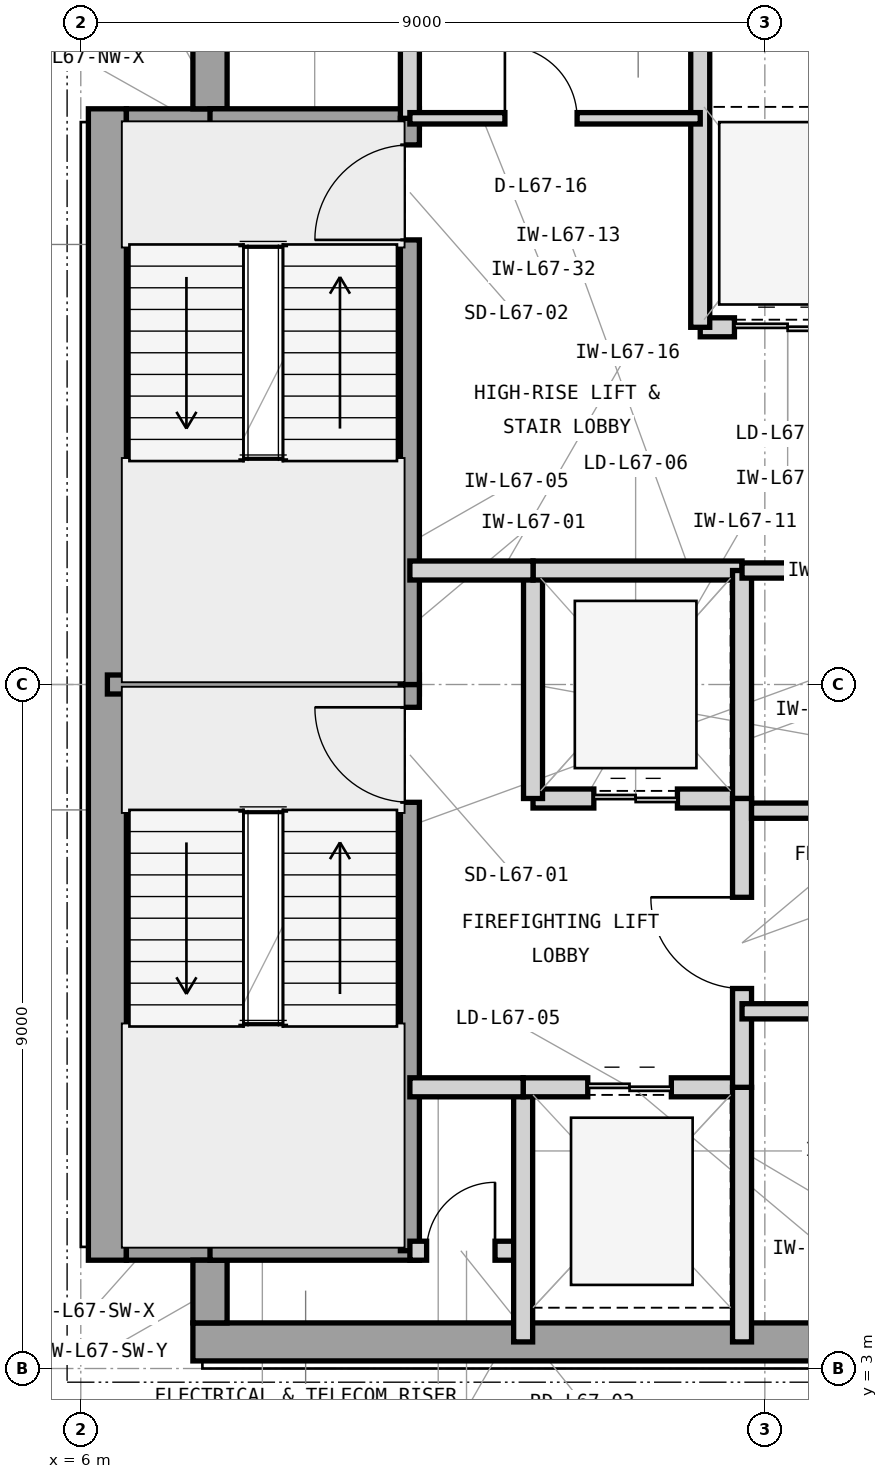
"""IFC4 building model, lengths in metres.
Left out: names, types, materials, properties, quantities, classifications, styles, units other than length and angle.
Written with IfcOpenShell. Run it as: python <this file> out.ifc"""

import sys

from ifc_helpers import new_model, si_unit, direction, frame, frame_2d, origin, place, context, subcontext, project, spatial, rectangle, extrude, element, fill, save


model = new_model("IFC4")
c1 = context("Model", 3, precision=1e-05, world=origin(), true_north=direction((0.0, 1.0)))
c2 = subcontext(c1, "Body", "Model", "MODEL_VIEW")
j1 = project(units=[si_unit("LENGTHUNIT", "METRE"), si_unit("PLANEANGLEUNIT", "RADIAN")], contexts=[c1])
p1 = place(None, origin())
s1 = spatial("IfcSite", under=j1, at=p1, CompositionType="ELEMENT")
p2 = place(p1, origin())
s2 = spatial("IfcBuilding", under=s1, at=p2, CompositionType="ELEMENT")
p3 = place(p2, frame((0.0, 0.0, 274.2)))
s3 = spatial("IfcBuildingStorey", under=s2, at=p3, CompositionType="ELEMENT", Elevation=274.2)
p4 = place(p3, frame((7.475, 3.35, 0.0), z_axis=(0.0, 0.0, 1.0), x_axis=(1.0, 0.0, 0.0)))
e1 = element("IfcWall", 1, at=p4, inside=s3, PredefinedType="SHEAR", context=c2, shape_type="SweptSolid", body=[
    extrude(rectangle(XDim=16.425, YDim=0.5, at=frame_2d((8.212, 0.0))), origin(), (0.0, 0.0, 1.0), 3.9),
])
p5 = place(p3, frame((6.35, 4.425, 0.0), z_axis=(0.0, 0.0, 1.0), x_axis=(0.0, 1.0, 0.0)))
e2 = element("IfcWall", 2, at=p5, inside=s3, PredefinedType="SHEAR", context=c2, shape_type="SweptSolid", body=[
    extrude(rectangle(XDim=15.15, YDim=0.5, at=frame_2d((7.575, 0.0))), origin(), (0.0, 0.0, 1.0), 3.9),
])
p6 = place(p3, frame((6.6, 4.65, 0.0), z_axis=(0.0, 0.0, 1.0), x_axis=(1.0, 0.0, 0.0)))
e3 = element("IfcWall", 3, at=p6, inside=s3, PredefinedType="SHEAR", context=c2, shape_type="SweptSolid", body=[
    extrude(rectangle(XDim=1.325, YDim=0.45, at=frame_2d((0.663, 0.0))), origin(), (0.0, 0.0, 1.0), 3.9),
])
p7 = place(p3, frame((7.7, 3.6, 0.0), z_axis=(0.0, 0.0, 1.0), x_axis=(0.0, 1.0, 0.0)))
e4 = element("IfcWall", 4, at=p7, inside=s3, PredefinedType="SHEAR", context=c2, shape_type="SweptSolid", body=[
    extrude(rectangle(XDim=0.825, YDim=0.45, at=frame_2d((0.413, 0.0))), origin(), (0.0, 0.0, 1.0), 3.9),
])
p8 = place(p3, frame((6.6, 19.35, 0.0), z_axis=(0.0, 0.0, 1.0), x_axis=(1.0, 0.0, 0.0)))
e5 = element("IfcWall", 5, at=p8, inside=s3, PredefinedType="SHEAR", context=c2, shape_type="SweptSolid", body=[
    extrude(rectangle(XDim=1.325, YDim=0.45, at=frame_2d((0.663, 0.0))), origin(), (0.0, 0.0, 1.0), 3.9),
])
p9 = place(p3, frame((7.7, 19.575, 0.0), z_axis=(0.0, 0.0, 1.0), x_axis=(0.0, 1.0, 0.0)))
e6 = element("IfcWall", 6, at=p9, inside=s3, PredefinedType="SHEAR", context=c2, shape_type="SweptSolid", body=[
    extrude(rectangle(XDim=0.825, YDim=0.45, at=frame_2d((0.413, 0.0))), origin(), (0.0, 0.0, 1.0), 3.9),
])
p10 = place(p3, frame((6.35, 12.0, 0.0), z_axis=(0.0, 0.0, 1.0), x_axis=(1.0, 0.0, 0.0)))
e7 = element("IfcWall", 7, at=p10, inside=s3, PredefinedType="SHEAR", context=c2, shape_type="SweptSolid", body=[
    extrude(rectangle(XDim=4.105, YDim=0.25, at=frame_2d((2.052, 0.0))), origin(), (0.0, 0.0, 1.0), 3.9),
])
for number, where, z_axis, x_axis in (
    (8, (7.7, 4.55, 0.0), (0.0, 0.0, 1.0), (1.0, 0.0, 0.0)),
    (9, (7.7, 19.45, 0.0), (0.0, 0.0, 1.0), (1.0, 0.0, 0.0)),
):
    element("IfcWall", number, at=place(p3, frame(where, z_axis=z_axis, x_axis=x_axis)), inside=s3, PredefinedType="SHEAR", context=c2, shape_type="SweptSolid", body=[
        extrude(rectangle(XDim=2.755, YDim=0.25, at=frame_2d((1.377, 0.0))), origin(), (0.0, 0.0, 1.0), 3.9),
    ])
p11 = place(p3, frame((10.33, 4.55, 0.0), z_axis=(0.0, 0.0, 1.0), x_axis=(0.0, 1.0, 0.0)))
e10 = element("IfcWall", 10, at=p11, inside=s3, PredefinedType="SHEAR", context=c2, shape_type="SweptSolid", body=[
    extrude(rectangle(XDim=7.45, YDim=0.25, at=frame_2d((3.725, 0.0))), origin(), (0.0, 0.0, 1.0), 3.9),
])
p12 = place(p11, frame((5.9, 0.0, 0.0)))
e11 = element("IfcOpeningElement", 11, at=p12, cuts=e10, PredefinedType="OPENING", context=c2, shape_type="SweptSolid", body=[
    extrude(rectangle(XDim=1.25, YDim=2.2, at=frame_2d((0.625, 1.1))), frame((0.0, 0.135, 0.0), z_axis=(0.0, -1.0, 0.0), x_axis=(1.0, 0.0, 0.0)), (0.0, 0.0, 1.0), 0.27),
])
p13 = place(p3, frame((10.33, 12.0, 0.0), z_axis=(0.0, 0.0, 1.0), x_axis=(0.0, 1.0, 0.0)))
e12 = element("IfcWall", 12, at=p13, inside=s3, PredefinedType="SHEAR", context=c2, shape_type="SweptSolid", body=[
    extrude(rectangle(XDim=7.45, YDim=0.25, at=frame_2d((3.725, 0.0))), origin(), (0.0, 0.0, 1.0), 3.9),
])
p14 = place(p13, frame((5.85, 0.0, 0.0)))
e13 = element("IfcOpeningElement", 13, at=p14, cuts=e12, PredefinedType="OPENING", context=c2, shape_type="SweptSolid", body=[
    extrude(rectangle(XDim=1.25, YDim=2.2, at=frame_2d((0.625, 1.1))), frame((0.0, 0.135, 0.0), z_axis=(0.0, -1.0, 0.0), x_axis=(1.0, 0.0, 0.0)), (0.0, 0.0, 1.0), 0.27),
])
p15 = place(p3, frame((10.33, 4.55, 0.0), z_axis=(0.0, 0.0, 1.0), x_axis=(1.0, 0.0, 0.0)))
e14 = element("IfcWall", 14, at=p15, inside=s3, PredefinedType="PARTITIONING", context=c2, shape_type="SweptSolid", body=[
    extrude(rectangle(XDim=1.49, YDim=0.25, at=frame_2d((0.745, 0.0))), origin(), (0.0, 0.0, 1.0), 3.705),
])
p16 = place(p15, frame((0.22, 0.0, 0.0)))
e15 = element("IfcOpeningElement", 15, at=p16, cuts=e14, PredefinedType="OPENING", context=c2, shape_type="SweptSolid", body=[
    extrude(rectangle(XDim=0.9, YDim=2.1, at=frame_2d((0.45, 1.05))), frame((0.0, 0.135, 0.0), z_axis=(0.0, -1.0, 0.0), x_axis=(1.0, 0.0, 0.0)), (0.0, 0.0, 1.0), 0.27),
])
p17 = place(p3, frame((11.82, 3.35, 0.0), z_axis=(0.0, 0.0, 1.0), x_axis=(0.0, 1.0, 0.0)))
e16 = element("IfcWall", 16, at=p17, inside=s3, PredefinedType="PARTITIONING", context=c2, shape_type="SweptSolid", body=[
    extrude(rectangle(XDim=3.35, YDim=0.25, at=frame_2d((1.675, 0.0))), origin(), (0.0, 0.0, 1.0), 3.705),
])
p18 = place(p3, frame((10.33, 19.45, 0.0), z_axis=(0.0, 0.0, 1.0), x_axis=(0.0, 1.0, 0.0)))
e17 = element("IfcWall", 17, at=p18, inside=s3, PredefinedType="PARTITIONING", context=c2, shape_type="SweptSolid", body=[
    extrude(rectangle(XDim=1.2, YDim=0.25, at=frame_2d((0.6, 0.0))), origin(), (0.0, 0.0, 1.0), 3.705),
])
p19 = place(p3, frame((11.82, 6.7, 0.0), z_axis=(0.0, 0.0, 1.0), x_axis=(1.0, 0.0, 0.0)))
e18 = element("IfcWall", 18, at=p19, inside=s3, PredefinedType="PARTITIONING", context=c2, shape_type="SweptSolid", body=[
    extrude(rectangle(XDim=2.88, YDim=0.25, at=frame_2d((1.44, 0.0))), origin(), (0.0, 0.0, 1.0), 3.088),
])
p20 = place(p19, frame((0.85, 0.0, 0.0)))
e19 = element("IfcOpeningElement", 19, at=p20, cuts=e18, PredefinedType="OPENING", context=c2, shape_type="SweptSolid", body=[
    extrude(rectangle(XDim=1.1, YDim=2.25, at=frame_2d((0.55, 1.125))), frame((0.0, 0.135, 0.0), z_axis=(0.0, -1.0, 0.0), x_axis=(1.0, 0.0, 0.0)), (0.0, 0.0, 1.0), 0.27),
])
p21 = place(p3, frame((14.7, 3.35, 0.0), z_axis=(0.0, 0.0, 1.0), x_axis=(0.0, 1.0, 0.0)))
e20 = element("IfcWall", 20, at=p21, inside=s3, PredefinedType="PARTITIONING", context=c2, shape_type="SweptSolid", body=[
    extrude(rectangle(XDim=3.35, YDim=0.25, at=frame_2d((1.675, 0.0))), origin(), (0.0, 0.0, 1.0), 3.705),
])
p22 = place(p3, frame((11.95, 10.5, 0.0), z_axis=(0.0, 0.0, 1.0), x_axis=(1.0, 0.0, 0.0)))
e21 = element("IfcWall", 21, at=p22, inside=s3, PredefinedType="PARTITIONING", context=c2, shape_type="SweptSolid", body=[
    extrude(rectangle(XDim=2.75, YDim=0.25, at=frame_2d((1.375, 0.0))), origin(), (0.0, 0.0, 1.0), 3.088),
])
p23 = place(p22, frame((0.8, 0.0, 0.0)))
e22 = element("IfcOpeningElement", 22, at=p23, cuts=e21, PredefinedType="OPENING", context=c2, shape_type="SweptSolid", body=[
    extrude(rectangle(XDim=1.1, YDim=2.25, at=frame_2d((0.55, 1.125))), frame((0.0, 0.135, 0.0), z_axis=(0.0, -1.0, 0.0), x_axis=(1.0, 0.0, 0.0)), (0.0, 0.0, 1.0), 0.27),
])
p24 = place(p3, frame((11.95, 10.5, 0.0), z_axis=(0.0, 0.0, 1.0), x_axis=(0.0, 1.0, 0.0)))
e23 = element("IfcWall", 23, at=p24, inside=s3, PredefinedType="PARTITIONING", context=c2, shape_type="SweptSolid", body=[
    extrude(rectangle(XDim=3.0, YDim=0.25, at=frame_2d((1.5, 0.0))), origin(), (0.0, 0.0, 1.0), 3.705),
])
p25 = place(p3, frame((11.95, 13.5, 0.0), z_axis=(0.0, 0.0, 1.0), x_axis=(1.0, 0.0, 0.0)))
e24 = element("IfcWall", 24, at=p25, inside=s3, PredefinedType="PARTITIONING", context=c2, shape_type="SweptSolid", body=[
    extrude(rectangle(XDim=2.75, YDim=0.25, at=frame_2d((1.375, 0.0))), origin(), (0.0, 0.0, 1.0), 3.088),
])
p26 = place(p3, frame((14.7, 10.5, 0.0), z_axis=(0.0, 0.0, 1.0), x_axis=(0.0, 1.0, 0.0)))
e25 = element("IfcWall", 25, at=p26, inside=s3, PredefinedType="PARTITIONING", context=c2, shape_type="SweptSolid", body=[
    extrude(rectangle(XDim=3.0, YDim=0.25, at=frame_2d((1.5, 0.0))), origin(), (0.0, 0.0, 1.0), 3.705),
])
p27 = place(p3, frame((14.7, 6.7, 0.0), z_axis=(0.0, 0.0, 1.0), x_axis=(0.0, 1.0, 0.0)))
e26 = element("IfcWall", 26, at=p27, inside=s3, PredefinedType="PARTITIONING", context=c2, shape_type="SweptSolid", body=[
    extrude(rectangle(XDim=3.8, YDim=0.25, at=frame_2d((1.9, 0.0))), origin(), (0.0, 0.0, 1.0), 3.705),
])
p28 = place(p27, frame((1.3, 0.0, 0.0)))
e27 = element("IfcOpeningElement", 27, at=p28, cuts=e26, PredefinedType="OPENING", context=c2, shape_type="SweptSolid", body=[
    extrude(rectangle(XDim=1.2, YDim=2.2, at=frame_2d((0.6, 1.1))), frame((0.0, 0.135, 0.0), z_axis=(0.0, -1.0, 0.0), x_axis=(1.0, 0.0, 0.0)), (0.0, 0.0, 1.0), 0.27),
])
p29 = place(p3, frame((10.33, 13.5, 0.0), z_axis=(0.0, 0.0, 1.0), x_axis=(1.0, 0.0, 0.0)))
e28 = element("IfcWall", 28, at=p29, inside=s3, PredefinedType="PARTITIONING", context=c2, shape_type="SweptSolid", body=[
    extrude(rectangle(XDim=1.62, YDim=0.25, at=frame_2d((0.81, 0.0))), origin(), (0.0, 0.0, 1.0), 3.088),
])
p30 = place(p3, frame((10.33, 6.7, 0.0), z_axis=(0.0, 0.0, 1.0), x_axis=(1.0, 0.0, 0.0)))
e29 = element("IfcWall", 29, at=p30, inside=s3, PredefinedType="PARTITIONING", context=c2, shape_type="SweptSolid", body=[
    extrude(rectangle(XDim=1.49, YDim=0.25, at=frame_2d((0.745, 0.0))), origin(), (0.0, 0.0, 1.0), 3.088),
])
p31 = place(p3, frame((14.15, 16.7, 0.0), z_axis=(0.0, 0.0, 1.0), x_axis=(1.0, 0.0, 0.0)))
e30 = element("IfcWall", 30, at=p31, inside=s3, PredefinedType="PARTITIONING", context=c2, shape_type="SweptSolid", body=[
    extrude(rectangle(XDim=2.3, YDim=0.25, at=frame_2d((1.15, 0.0))), origin(), (0.0, 0.0, 1.0), 3.088),
])
p32 = place(p31, frame((0.45, 0.0, 0.0)))
e31 = element("IfcOpeningElement", 31, at=p32, cuts=e30, PredefinedType="OPENING", context=c2, shape_type="SweptSolid", body=[
    extrude(rectangle(XDim=1.4, YDim=2.35, at=frame_2d((0.7, 1.175))), frame((0.0, 0.135, 0.0), z_axis=(0.0, -1.0, 0.0), x_axis=(1.0, 0.0, 0.0)), (0.0, 0.0, 1.0), 0.27),
])
p33 = place(p3, frame((14.15, 16.7, 0.0), z_axis=(0.0, 0.0, 1.0), x_axis=(0.0, 1.0, 0.0)))
e32 = element("IfcWall", 32, at=p33, inside=s3, PredefinedType="PARTITIONING", context=c2, shape_type="SweptSolid", body=[
    extrude(rectangle(XDim=3.95, YDim=0.25, at=frame_2d((1.975, 0.0))), origin(), (0.0, 0.0, 1.0), 3.705),
])
p34 = place(p3, frame((14.7, 7.7, 0.0), z_axis=(0.0, 0.0, 1.0), x_axis=(1.0, 0.0, 0.0)))
e33 = element("IfcWall", 33, at=p34, inside=s3, PredefinedType="PARTITIONING", context=c2, shape_type="SweptSolid", body=[
    extrude(rectangle(XDim=5.0, YDim=0.2, at=frame_2d((2.5, 0.0))), origin(), (0.0, 0.0, 1.0), 3.705),
])
p35 = place(p34, frame((2.025, 0.0, 0.0)))
e34 = element("IfcOpeningElement", 34, at=p35, cuts=e33, PredefinedType="OPENING", context=c2, shape_type="SweptSolid", body=[
    extrude(rectangle(XDim=0.95, YDim=2.1, at=frame_2d((0.475, 1.05))), frame((0.0, 0.11, 0.0), z_axis=(0.0, -1.0, 0.0), x_axis=(1.0, 0.0, 0.0)), (0.0, 0.0, 1.0), 0.22),
])
p36 = place(p3, frame((14.825, 10.34, 0.0), z_axis=(0.0, 0.0, 1.0), x_axis=(1.0, 0.0, 0.0)))
e35 = element("IfcWall", 35, at=p36, inside=s3, PredefinedType="PARTITIONING", context=c2, shape_type="SweptSolid", body=[
    extrude(rectangle(XDim=4.88, YDim=0.2, at=frame_2d((2.44, 0.0))), origin(), (0.0, 0.0, 1.0), 3.088),
])
p37 = place(p3, frame((14.7, 13.5, 0.0), z_axis=(0.0, 0.0, 1.0), x_axis=(1.0, 0.0, 0.0)))
e36 = element("IfcWall", 36, at=p37, inside=s3, PredefinedType="PARTITIONING", context=c2, shape_type="SweptSolid", body=[
    extrude(rectangle(XDim=5.15, YDim=0.2, at=frame_2d((2.575, 0.0))), origin(), (0.0, 0.0, 1.0), 3.088),
])
p38 = place(p37, frame((2.1, 0.0, 0.0)))
e37 = element("IfcOpeningElement", 37, at=p38, cuts=e36, PredefinedType="OPENING", context=c2, shape_type="SweptSolid", body=[
    extrude(rectangle(XDim=0.95, YDim=2.1, at=frame_2d((0.475, 1.05))), frame((0.0, 0.11, 0.0), z_axis=(0.0, -1.0, 0.0), x_axis=(1.0, 0.0, 0.0)), (0.0, 0.0, 1.0), 0.22),
])
p39 = place(p3, frame((10.33, 19.45, 0.0), z_axis=(0.0, 0.0, 1.0), x_axis=(1.0, 0.0, 0.0)))
e38 = element("IfcWall", 38, at=p39, inside=s3, PredefinedType="PARTITIONING", context=c2, shape_type="SweptSolid", body=[
    extrude(rectangle(XDim=3.82, YDim=0.15, at=frame_2d((1.91, 0.0))), origin(), (0.0, 0.0, 1.0), 3.705),
])
p40 = place(p39, frame((1.25, 0.0, 0.0)))
e39 = element("IfcOpeningElement", 39, at=p40, cuts=e38, PredefinedType="OPENING", context=c2, shape_type="SweptSolid", body=[
    extrude(rectangle(XDim=0.95, YDim=2.1, at=frame_2d((0.475, 1.05))), frame((0.0, 0.085, 0.0), z_axis=(0.0, -1.0, 0.0), x_axis=(1.0, 0.0, 0.0)), (0.0, 0.0, 1.0), 0.17),
])
p41 = place(p12, origin())
e40 = element("IfcDoor", 40, at=p41, inside=s3, OperationType="SINGLE_SWING_RIGHT", PredefinedType="DOOR", context=c2, shape_type="SweptSolid", body=[
    extrude(rectangle(XDim=1.25, YDim=2.2, at=frame_2d((0.625, 1.1))), frame((0.0, 0.025, 0.0), z_axis=(0.0, -1.0, 0.0), x_axis=(1.0, 0.0, 0.0)), (0.0, 0.0, 1.0), 0.05),
])
fill(e11, e40)
p42 = place(p14, origin())
e41 = element("IfcDoor", 41, at=p42, inside=s3, OperationType="SINGLE_SWING_LEFT", PredefinedType="DOOR", context=c2, shape_type="SweptSolid", body=[
    extrude(rectangle(XDim=1.25, YDim=2.2, at=frame_2d((0.625, 1.1))), frame((0.0, 0.025, 0.0), z_axis=(0.0, -1.0, 0.0), x_axis=(1.0, 0.0, 0.0)), (0.0, 0.0, 1.0), 0.05),
])
fill(e13, e41)
p43 = place(p16, origin())
e42 = element("IfcDoor", 42, at=p43, inside=s3, OperationType="SINGLE_SWING_RIGHT", PredefinedType="TRAPDOOR", context=c2, shape_type="SweptSolid", body=[
    extrude(rectangle(XDim=0.9, YDim=2.1, at=frame_2d((0.45, 1.05))), frame((0.0, 0.025, 0.0), z_axis=(0.0, -1.0, 0.0), x_axis=(1.0, 0.0, 0.0)), (0.0, 0.0, 1.0), 0.05),
])
fill(e15, e42)
p44 = place(p20, origin())
e43 = element("IfcDoor", 43, at=p44, inside=s3, OperationType="DOUBLE_DOOR_SLIDING", PredefinedType="DOOR", context=c2, shape_type="SweptSolid", body=[
    extrude(rectangle(XDim=1.1, YDim=2.25, at=frame_2d((0.55, 1.125))), frame((0.0, 0.025, 0.0), z_axis=(0.0, -1.0, 0.0), x_axis=(1.0, 0.0, 0.0)), (0.0, 0.0, 1.0), 0.05),
])
fill(e19, e43)
p45 = place(p23, origin())
e44 = element("IfcDoor", 44, at=p45, inside=s3, OperationType="DOUBLE_DOOR_SLIDING", PredefinedType="DOOR", context=c2, shape_type="SweptSolid", body=[
    extrude(rectangle(XDim=1.1, YDim=2.25, at=frame_2d((0.55, 1.125))), frame((0.0, 0.025, 0.0), z_axis=(0.0, -1.0, 0.0), x_axis=(1.0, 0.0, 0.0)), (0.0, 0.0, 1.0), 0.05),
])
fill(e22, e44)
p46 = place(p28, origin())
e45 = element("IfcDoor", 45, at=p46, inside=s3, OperationType="SINGLE_SWING_RIGHT", PredefinedType="DOOR", context=c2, shape_type="SweptSolid", body=[
    extrude(rectangle(XDim=1.2, YDim=2.2, at=frame_2d((0.6, 1.1))), frame((0.0, 0.025, 0.0), z_axis=(0.0, -1.0, 0.0), x_axis=(1.0, 0.0, 0.0)), (0.0, 0.0, 1.0), 0.05),
])
fill(e27, e45)
p47 = place(p32, origin())
e46 = element("IfcDoor", 46, at=p47, inside=s3, OperationType="DOUBLE_DOOR_SLIDING", PredefinedType="DOOR", context=c2, shape_type="SweptSolid", body=[
    extrude(rectangle(XDim=1.4, YDim=2.35, at=frame_2d((0.7, 1.175))), frame((0.0, 0.025, 0.0), z_axis=(0.0, -1.0, 0.0), x_axis=(1.0, 0.0, 0.0)), (0.0, 0.0, 1.0), 0.05),
])
fill(e31, e46)
p48 = place(p40, origin())
e47 = element("IfcDoor", 47, at=p48, inside=s3, OperationType="SINGLE_SWING_LEFT", PredefinedType="DOOR", context=c2, shape_type="SweptSolid", body=[
    extrude(rectangle(XDim=0.95, YDim=2.1, at=frame_2d((0.475, 1.05))), frame((0.0, 0.025, 0.0), z_axis=(0.0, -1.0, 0.0), x_axis=(1.0, 0.0, 0.0)), (0.0, 0.0, 1.0), 0.05),
])
fill(e39, e47)
save(model, sys.argv[1])
